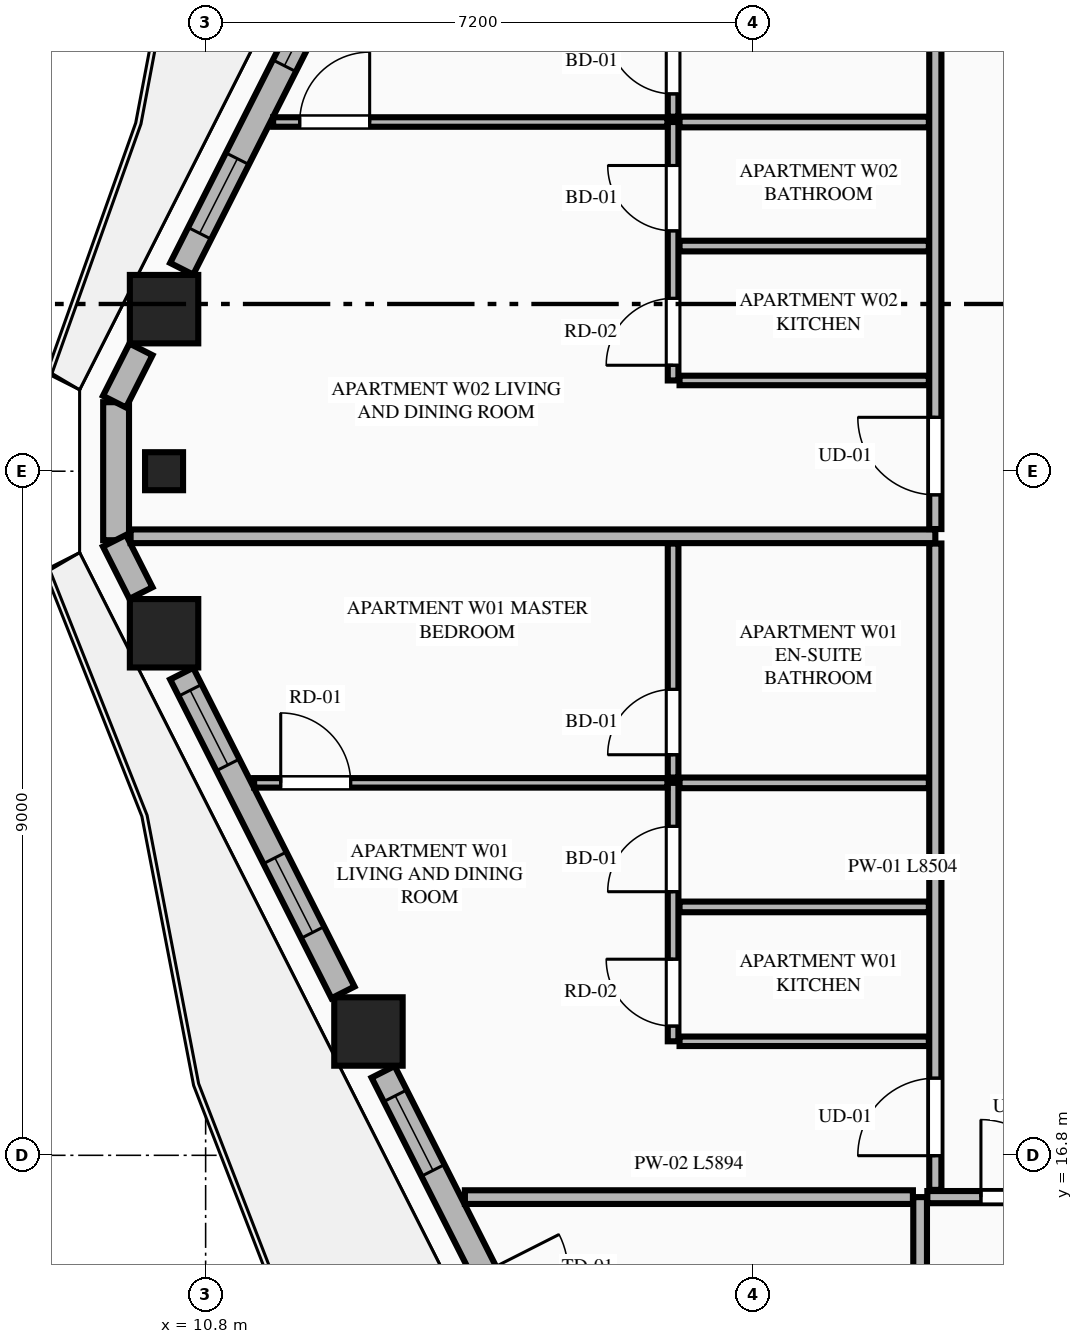
"""IFC4 building model, lengths in metres.
Left out: names, types, materials, properties, quantities, classifications, styles, units other than length and angle.
Written with IfcOpenShell. Run it as: python <this file> out.ifc"""

import sys

from ifc_helpers import new_model, si_unit, direction, frame, frame_2d, origin, origin_2d, place, context, subcontext, project, spatial, rectangle, extrude, element, fill, save


model = new_model("IFC4")
c1 = context("Model", 3, precision=1e-05, world=origin(), true_north=direction((0.0, 1.0)))
c2 = subcontext(c1, "Body", "Model", "MODEL_VIEW")
j1 = project(units=[si_unit("LENGTHUNIT", "METRE"), si_unit("PLANEANGLEUNIT", "RADIAN")], contexts=[c1])
p1 = place(None, origin())
s1 = spatial("IfcSite", under=j1, at=p1, CompositionType="ELEMENT")
p2 = place(p1, origin())
s2 = spatial("IfcBuilding", under=s1, at=p2, CompositionType="ELEMENT")
p3 = place(p2, frame((0.0, 0.0, 189.65)))
s3 = spatial("IfcBuildingStorey", under=s2, at=p3, CompositionType="ELEMENT", Elevation=189.65)
for number, where, z_axis, x_axis in (
    (1, (10.253, 27.932, 0.0), (0.0, 0.0, 1.0), (1.0, 0.0, 0.0)),
    (2, (10.253, 23.668, 0.0), (0.0, 0.0, 1.0), (1.0, 0.0, 0.0)),
    (3, (12.942, 18.429, 0.0), (0.0, 0.0, 1.0), (1.0, 0.0, 0.0)),
):
    element("IfcColumn", number, at=place(p3, frame(where, z_axis=z_axis, x_axis=x_axis)), inside=s3, PredefinedType="COLUMN", context=c2, shape_type="SweptSolid", body=[
        extrude(rectangle(XDim=0.9, YDim=0.9, at=origin_2d()), origin(), (0.0, 0.0, 1.0), 3.55),
    ])
p4 = place(p3, frame((10.253, 25.8, 0.0), z_axis=(0.0, 0.0, 1.0), x_axis=(0.0, -1.0, 0.0)))
e4 = element("IfcColumn", 4, at=p4, inside=s3, PredefinedType="PILASTER", context=c2, shape_type="SweptSolid", body=[
    extrude(rectangle(XDim=0.5, YDim=0.35, at=origin_2d()), origin(), (0.0, 0.0, 1.0), 3.55),
])
p5 = place(p3, frame((9.622, 26.708, 0.0), z_axis=(0.0, 0.0, 1.0), x_axis=(0.0, -1.0, 0.0)))
e5 = element("IfcWall", 5, at=p5, inside=s3, PredefinedType="STANDARD", context=c2, shape_type="SweptSolid", body=[
    extrude(rectangle(XDim=1.816, YDim=0.34, at=frame_2d((0.908, 0.0))), origin(), (0.0, 0.0, 1.0), 3.35),
])
p6 = place(p3, frame((12.607, 32.657, 0.0), z_axis=(0.0, 0.0, 1.0), x_axis=(-0.451426298588, -0.892308409096, 0.0)))
e6 = element("IfcWall", 6, at=p6, inside=s3, PredefinedType="STANDARD", context=c2, shape_type="SweptSolid", body=[
    extrude(rectangle(XDim=4.7, YDim=0.34, at=frame_2d((2.35, 0.0))), origin(), (0.0, 0.0, 1.0), 2.883),
])
p7 = place(p6, frame((0.607, 0.0, 0.75)))
e7 = element("IfcOpeningElement", 7, at=p7, cuts=e6, PredefinedType="OPENING", context=c2, shape_type="SweptSolid", body=[
    extrude(rectangle(XDim=1.1, YDim=1.983, at=frame_2d((0.55, 0.991))), frame((0.0, 0.18, 0.0), z_axis=(0.0, -1.0, 0.0), x_axis=(1.0, 0.0, 0.0)), (0.0, 0.0, 1.0), 0.36),
])
p8 = place(p6, frame((3.077, 0.0, 0.75)))
e8 = element("IfcOpeningElement", 8, at=p8, cuts=e6, PredefinedType="OPENING", context=c2, shape_type="SweptSolid", body=[
    extrude(rectangle(XDim=1.1, YDim=1.983, at=frame_2d((0.55, 0.991))), frame((0.0, 0.18, 0.0), z_axis=(0.0, -1.0, 0.0), x_axis=(1.0, 0.0, 0.0)), (0.0, 0.0, 1.0), 0.36),
])
for number, where, z_axis, x_axis in (
    (9, (9.949, 27.403, 0.0), (0.0, 0.0, 1.0), (-0.451, -0.892, 0.0)),
    (10, (9.601, 24.885, 0.0), (0.0, 0.0, 1.0), (0.451, -0.892, 0.0)),
):
    element("IfcWall", number, at=place(p3, frame(where, z_axis=z_axis, x_axis=x_axis)), inside=s3, PredefinedType="STANDARD", context=c2, shape_type="SweptSolid", body=[
        extrude(rectangle(XDim=0.771, YDim=0.34, at=frame_2d((0.385, 0.0))), origin(), (0.0, 0.0, 1.0), 3.35),
    ])
p9 = place(p3, frame((10.485, 23.137, 0.0), z_axis=(0.0, 0.0, 1.0), x_axis=(0.451447222193, -0.892297823361, 0.0)))
e11 = element("IfcWall", 11, at=p9, inside=s3, PredefinedType="STANDARD", context=c2, shape_type="SweptSolid", body=[
    extrude(rectangle(XDim=4.7, YDim=0.34, at=frame_2d((2.35, 0.0))), origin(), (0.0, 0.0, 1.0), 2.883),
])
p10 = place(p9, frame((0.246, 0.0, 0.75)))
e12 = element("IfcOpeningElement", 12, at=p10, cuts=e11, PredefinedType="OPENING", context=c2, shape_type="SweptSolid", body=[
    extrude(rectangle(XDim=1.1, YDim=1.983, at=frame_2d((0.55, 0.991))), frame((0.0, 0.18, 0.0), z_axis=(0.0, -1.0, 0.0), x_axis=(1.0, 0.0, 0.0)), (0.0, 0.0, 1.0), 0.36),
])
p11 = place(p9, frame((2.716, 0.0, 0.75)))
e13 = element("IfcOpeningElement", 13, at=p11, cuts=e11, PredefinedType="OPENING", context=c2, shape_type="SweptSolid", body=[
    extrude(rectangle(XDim=1.1, YDim=1.983, at=frame_2d((0.55, 0.991))), frame((0.0, 0.18, 0.0), z_axis=(0.0, -1.0, 0.0), x_axis=(1.0, 0.0, 0.0)), (0.0, 0.0, 1.0), 0.36),
])
p12 = place(p3, frame((13.135, 17.898, 0.0), z_axis=(0.0, 0.0, 1.0), x_axis=(0.451544279509, -0.892248711763, 0.0)))
e14 = element("IfcWall", 14, at=p12, inside=s3, PredefinedType="STANDARD", context=c2, shape_type="SweptSolid", body=[
    extrude(rectangle(XDim=4.91, YDim=0.34, at=frame_2d((2.455, 0.0))), origin(), (0.0, 0.0, 1.0), 2.883),
])
p13 = place(p12, frame((2.954, 0.0, 0.0)))
e15 = element("IfcOpeningElement", 15, at=p13, cuts=e14, PredefinedType="OPENING", context=c2, shape_type="SweptSolid", body=[
    extrude(rectangle(XDim=1.1, YDim=2.25, at=frame_2d((0.55, 1.125))), frame((0.0, 0.18, 0.0), z_axis=(0.0, -1.0, 0.0), x_axis=(1.0, 0.0, 0.0)), (0.0, 0.0, 1.0), 0.36),
])
p14 = place(p12, frame((0.353, 0.0, 0.75)))
e16 = element("IfcOpeningElement", 16, at=p14, cuts=e14, PredefinedType="OPENING", context=c2, shape_type="SweptSolid", body=[
    extrude(rectangle(XDim=1.1, YDim=1.983, at=frame_2d((0.55, 0.991))), frame((0.0, 0.18, 0.0), z_axis=(0.0, -1.0, 0.0), x_axis=(1.0, 0.0, 0.0)), (0.0, 0.0, 1.0), 0.36),
])
p15 = place(p3, frame((20.2, 5.968, 0.0), z_axis=(0.0, 0.0, 1.0), x_axis=(0.0, 1.0, 0.0)))
e17 = element("IfcWall", 17, at=p15, inside=s3, PredefinedType="PARTITIONING", context=c2, shape_type="SweptSolid", body=[
    extrude(rectangle(XDim=10.282, YDim=0.18, at=frame_2d((5.141, 0.0))), origin(), (0.0, 0.0, 1.0), 3.35),
])
p16 = place(p3, frame((20.295, 16.25, 0.0), z_axis=(0.0, 0.0, 1.0), x_axis=(1.0, 0.0, 0.0)))
e18 = element("IfcWall", 18, at=p16, inside=s3, PredefinedType="PARTITIONING", context=c2, shape_type="SweptSolid", body=[
    extrude(rectangle(XDim=8.467, YDim=0.16, at=frame_2d((4.233, 0.0))), origin(), (0.0, 0.0, 1.0), 3.35),
])
p17 = place(p16, frame((0.705, 0.0, 0.0)))
e19 = element("IfcOpeningElement", 19, at=p17, cuts=e18, PredefinedType="OPENING", context=c2, shape_type="SweptSolid", body=[
    extrude(rectangle(XDim=1.02, YDim=2.25, at=frame_2d((0.51, 1.125))), frame((0.0, 0.09, 0.0), z_axis=(0.0, -1.0, 0.0), x_axis=(1.0, 0.0, 0.0)), (0.0, 0.0, 1.0), 0.18),
])
p18 = place(p3, frame((14.211, 16.25, 0.0), z_axis=(0.0, 0.0, 1.0), x_axis=(1.0, 0.0, 0.0)))
e20 = element("IfcWall", 20, at=p18, inside=s3, PredefinedType="PARTITIONING", context=c2, shape_type="SweptSolid", body=[
    extrude(rectangle(XDim=5.894, YDim=0.18, at=frame_2d((2.947, 0.0))), origin(), (0.0, 0.0, 1.0), 3.35),
])
p19 = place(p3, frame((20.4, 16.345, 0.0), z_axis=(0.0, 0.0, 1.0), x_axis=(0.0, 1.0, 0.0)))
e21 = element("IfcWall", 21, at=p19, inside=s3, PredefinedType="PARTITIONING", context=c2, shape_type="SweptSolid", body=[
    extrude(rectangle(XDim=8.504, YDim=0.16, at=frame_2d((4.252, 0.0))), origin(), (0.0, 0.0, 1.0), 3.35),
])
p20 = place(p19, frame((0.45, 0.0, 0.0)))
e22 = element("IfcOpeningElement", 22, at=p20, cuts=e21, PredefinedType="OPENING", context=c2, shape_type="SweptSolid", body=[
    extrude(rectangle(XDim=1.02, YDim=2.25, at=frame_2d((0.51, 1.125))), frame((0.0, 0.09, 0.0), z_axis=(0.0, -1.0, 0.0), x_axis=(1.0, 0.0, 0.0)), (0.0, 0.0, 1.0), 0.18),
])
p21 = place(p3, frame((17.035, 18.3, 0.0), z_axis=(0.0, 0.0, 1.0), x_axis=(1.0, 0.0, 0.0)))
e23 = element("IfcWall", 23, at=p21, inside=s3, PredefinedType="PARTITIONING", context=c2, shape_type="SweptSolid", body=[
    extrude(rectangle(XDim=3.28, YDim=0.125, at=frame_2d((1.64, 0.0))), origin(), (0.0, 0.0, 1.0), 2.807),
])
p22 = place(p3, frame((16.95, 18.3, 0.0), z_axis=(0.0, 0.0, 1.0), x_axis=(0.0, 1.0, 0.0)))
e24 = element("IfcWall", 24, at=p22, inside=s3, PredefinedType="PLUMBINGWALL", context=c2, shape_type="SweptSolid", body=[
    extrude(rectangle(XDim=3.4, YDim=0.14, at=frame_2d((1.7, 0.0))), origin(), (0.0, 0.0, 1.0), 3.35),
])
p23 = place(p22, frame((0.2, 0.0, 0.0)))
e25 = element("IfcOpeningElement", 25, at=p23, cuts=e24, PredefinedType="OPENING", context=c2, shape_type="SweptSolid", body=[
    extrude(rectangle(XDim=0.88, YDim=2.15, at=frame_2d((0.44, 1.075))), frame((0.0, 0.08, 0.0), z_axis=(0.0, -1.0, 0.0), x_axis=(1.0, 0.0, 0.0)), (0.0, 0.0, 1.0), 0.16),
])
p24 = place(p22, frame((1.968, 0.0, 0.0)))
e26 = element("IfcOpeningElement", 26, at=p24, cuts=e24, PredefinedType="OPENING", context=c2, shape_type="SweptSolid", body=[
    extrude(rectangle(XDim=0.86, YDim=2.1, at=frame_2d((0.43, 1.05))), frame((0.0, 0.08, 0.0), z_axis=(0.0, -1.0, 0.0), x_axis=(1.0, 0.0, 0.0)), (0.0, 0.0, 1.0), 0.16),
])
p25 = place(p3, frame((16.95, 21.77, 0.0), z_axis=(0.0, 0.0, 1.0), x_axis=(0.0, 1.0, 0.0)))
e27 = element("IfcWall", 27, at=p25, inside=s3, PredefinedType="PLUMBINGWALL", context=c2, shape_type="SweptSolid", body=[
    extrude(rectangle(XDim=3.079, YDim=0.14, at=frame_2d((1.54, 0.0))), origin(), (0.0, 0.0, 1.0), 3.35),
])
p26 = place(p25, frame((0.3, 0.0, 0.0)))
e28 = element("IfcOpeningElement", 28, at=p26, cuts=e27, PredefinedType="OPENING", context=c2, shape_type="SweptSolid", body=[
    extrude(rectangle(XDim=0.86, YDim=2.1, at=frame_2d((0.43, 1.05))), frame((0.0, 0.08, 0.0), z_axis=(0.0, -1.0, 0.0), x_axis=(1.0, 0.0, 0.0)), (0.0, 0.0, 1.0), 0.16),
])
p27 = place(p3, frame((17.035, 21.7, 0.0), z_axis=(0.0, 0.0, 1.0), x_axis=(1.0, 0.0, 0.0)))
e29 = element("IfcWall", 29, at=p27, inside=s3, PredefinedType="PLUMBINGWALL", context=c2, shape_type="SweptSolid", body=[
    extrude(rectangle(XDim=3.28, YDim=0.14, at=frame_2d((1.64, 0.0))), origin(), (0.0, 0.0, 1.0), 3.35),
])
p28 = place(p3, frame((11.438, 21.7, 0.0), z_axis=(0.0, 0.0, 1.0), x_axis=(1.0, 0.0, 0.0)))
e30 = element("IfcWall", 30, at=p28, inside=s3, PredefinedType="PARTITIONING", context=c2, shape_type="SweptSolid", body=[
    extrude(rectangle(XDim=5.437, YDim=0.125, at=frame_2d((2.719, 0.0))), origin(), (0.0, 0.0, 1.0), 3.35),
])
p29 = place(p28, frame((0.35, 0.0, 0.0)))
e31 = element("IfcOpeningElement", 31, at=p29, cuts=e30, PredefinedType="OPENING", context=c2, shape_type="SweptSolid", body=[
    extrude(rectangle(XDim=0.92, YDim=2.15, at=frame_2d((0.46, 1.075))), frame((0.0, 0.073, 0.0), z_axis=(0.0, -1.0, 0.0), x_axis=(1.0, 0.0, 0.0)), (0.0, 0.0, 1.0), 0.145),
])
p30 = place(p3, frame((17.035, 20.068, 0.0), z_axis=(0.0, 0.0, 1.0), x_axis=(1.0, 0.0, 0.0)))
e32 = element("IfcWall", 32, at=p30, inside=s3, PredefinedType="PLUMBINGWALL", context=c2, shape_type="SweptSolid", body=[
    extrude(rectangle(XDim=3.28, YDim=0.14, at=frame_2d((1.64, 0.0))), origin(), (0.0, 0.0, 1.0), 3.35),
])
p31 = place(p3, frame((9.813, 24.944, 0.0), z_axis=(0.0, 0.0, 1.0), x_axis=(1.0, 0.0, 0.0)))
e33 = element("IfcWall", 33, at=p31, inside=s3, PredefinedType="PARTITIONING", context=c2, shape_type="SweptSolid", body=[
    extrude(rectangle(XDim=10.587, YDim=0.18, at=frame_2d((5.293, 0.0))), origin(), (0.0, 0.0, 1.0), 3.35),
])
p32 = place(p3, frame((20.4, 25.039, 0.0), z_axis=(0.0, 0.0, 1.0), x_axis=(0.0, 1.0, 0.0)))
e34 = element("IfcWall", 34, at=p32, inside=s3, PredefinedType="PARTITIONING", context=c2, shape_type="SweptSolid", body=[
    extrude(rectangle(XDim=10.016, YDim=0.16, at=frame_2d((5.008, 0.0))), origin(), (0.0, 0.0, 1.0), 3.35),
])
p33 = place(p32, frame((0.45, 0.0, 0.0)))
e35 = element("IfcOpeningElement", 35, at=p33, cuts=e34, PredefinedType="OPENING", context=c2, shape_type="SweptSolid", body=[
    extrude(rectangle(XDim=1.02, YDim=2.25, at=frame_2d((0.51, 1.125))), frame((0.0, 0.09, 0.0), z_axis=(0.0, -1.0, 0.0), x_axis=(1.0, 0.0, 0.0)), (0.0, 0.0, 1.0), 0.18),
])
p34 = place(p3, frame((17.035, 26.994, 0.0), z_axis=(0.0, 0.0, 1.0), x_axis=(1.0, 0.0, 0.0)))
e36 = element("IfcWall", 36, at=p34, inside=s3, PredefinedType="PARTITIONING", context=c2, shape_type="SweptSolid", body=[
    extrude(rectangle(XDim=3.28, YDim=0.125, at=frame_2d((1.64, 0.0))), origin(), (0.0, 0.0, 1.0), 3.35),
])
p35 = place(p3, frame((16.95, 26.994, 0.0), z_axis=(0.0, 0.0, 1.0), x_axis=(0.0, 1.0, 0.0)))
e37 = element("IfcWall", 37, at=p35, inside=s3, PredefinedType="PLUMBINGWALL", context=c2, shape_type="SweptSolid", body=[
    extrude(rectangle(XDim=3.4, YDim=0.14, at=frame_2d((1.7, 0.0))), origin(), (0.0, 0.0, 1.0), 3.35),
])
p36 = place(p35, frame((0.2, 0.0, 0.0)))
e38 = element("IfcOpeningElement", 38, at=p36, cuts=e37, PredefinedType="OPENING", context=c2, shape_type="SweptSolid", body=[
    extrude(rectangle(XDim=0.88, YDim=2.15, at=frame_2d((0.44, 1.075))), frame((0.0, 0.08, 0.0), z_axis=(0.0, -1.0, 0.0), x_axis=(1.0, 0.0, 0.0)), (0.0, 0.0, 1.0), 0.16),
])
p37 = place(p35, frame((1.968, 0.0, 0.0)))
e39 = element("IfcOpeningElement", 39, at=p37, cuts=e37, PredefinedType="OPENING", context=c2, shape_type="SweptSolid", body=[
    extrude(rectangle(XDim=0.86, YDim=2.1, at=frame_2d((0.43, 1.05))), frame((0.0, 0.08, 0.0), z_axis=(0.0, -1.0, 0.0), x_axis=(1.0, 0.0, 0.0)), (0.0, 0.0, 1.0), 0.16),
])
p38 = place(p3, frame((16.95, 30.464, 0.0), z_axis=(0.0, 0.0, 1.0), x_axis=(0.0, 1.0, 0.0)))
e40 = element("IfcWall", 40, at=p38, inside=s3, PredefinedType="PLUMBINGWALL", context=c2, shape_type="SweptSolid", body=[
    extrude(rectangle(XDim=4.591, YDim=0.14, at=frame_2d((2.295, 0.0))), origin(), (0.0, 0.0, 1.0), 3.35),
])
p39 = place(p38, frame((0.3, 0.0, 0.0)))
e41 = element("IfcOpeningElement", 41, at=p39, cuts=e40, PredefinedType="OPENING", context=c2, shape_type="SweptSolid", body=[
    extrude(rectangle(XDim=0.86, YDim=2.1, at=frame_2d((0.43, 1.05))), frame((0.0, 0.08, 0.0), z_axis=(0.0, -1.0, 0.0), x_axis=(1.0, 0.0, 0.0)), (0.0, 0.0, 1.0), 0.16),
])
p40 = place(p3, frame((17.035, 30.394, 0.0), z_axis=(0.0, 0.0, 1.0), x_axis=(1.0, 0.0, 0.0)))
e42 = element("IfcWall", 42, at=p40, inside=s3, PredefinedType="PLUMBINGWALL", context=c2, shape_type="SweptSolid", body=[
    extrude(rectangle(XDim=3.28, YDim=0.14, at=frame_2d((1.64, 0.0))), origin(), (0.0, 0.0, 1.0), 3.35),
])
p41 = place(p3, frame((11.688, 30.394, 0.0), z_axis=(0.0, 0.0, 1.0), x_axis=(1.0, 0.0, 0.0)))
e43 = element("IfcWall", 43, at=p41, inside=s3, PredefinedType="PARTITIONING", context=c2, shape_type="SweptSolid", body=[
    extrude(rectangle(XDim=5.187, YDim=0.125, at=frame_2d((2.594, 0.0))), origin(), (0.0, 0.0, 1.0), 3.35),
])
p42 = place(p41, frame((0.35, 0.0, 0.0)))
e44 = element("IfcOpeningElement", 44, at=p42, cuts=e43, PredefinedType="OPENING", context=c2, shape_type="SweptSolid", body=[
    extrude(rectangle(XDim=0.92, YDim=2.15, at=frame_2d((0.46, 1.075))), frame((0.0, 0.073, 0.0), z_axis=(0.0, -1.0, 0.0), x_axis=(1.0, 0.0, 0.0)), (0.0, 0.0, 1.0), 0.145),
])
p43 = place(p3, frame((17.035, 28.762, 0.0), z_axis=(0.0, 0.0, 1.0), x_axis=(1.0, 0.0, 0.0)))
e45 = element("IfcWall", 45, at=p43, inside=s3, PredefinedType="PLUMBINGWALL", context=c2, shape_type="SweptSolid", body=[
    extrude(rectangle(XDim=3.28, YDim=0.14, at=frame_2d((1.64, 0.0))), origin(), (0.0, 0.0, 1.0), 3.35),
])
p44 = place(p7, origin())
e46 = element("IfcWindow", 46, at=p44, inside=s3, PartitioningType="SINGLE_PANEL", PredefinedType="WINDOW", context=c2, shape_type="SweptSolid", body=[
    extrude(rectangle(XDim=1.1, YDim=1.983, at=frame_2d((0.55, 0.991))), frame((0.0, 0.03, 0.0), z_axis=(0.0, -1.0, 0.0), x_axis=(1.0, 0.0, 0.0)), (0.0, 0.0, 1.0), 0.06),
])
fill(e7, e46)
p45 = place(p10, origin())
e47 = element("IfcWindow", 47, at=p45, inside=s3, PartitioningType="SINGLE_PANEL", PredefinedType="WINDOW", context=c2, shape_type="SweptSolid", body=[
    extrude(rectangle(XDim=1.1, YDim=1.983, at=frame_2d((0.55, 0.991))), frame((0.0, 0.03, 0.0), z_axis=(0.0, -1.0, 0.0), x_axis=(1.0, 0.0, 0.0)), (0.0, 0.0, 1.0), 0.06),
])
fill(e12, e47)
p46 = place(p17, origin())
e48 = element("IfcDoor", 48, at=p46, inside=s3, OperationType="SINGLE_SWING_LEFT", PredefinedType="DOOR", context=c2, shape_type="SweptSolid", body=[
    extrude(rectangle(XDim=1.02, YDim=2.25, at=frame_2d((0.51, 1.125))), frame((0.0, 0.025, 0.0), z_axis=(0.0, -1.0, 0.0), x_axis=(1.0, 0.0, 0.0)), (0.0, 0.0, 1.0), 0.05),
])
fill(e19, e48)
p47 = place(p23, origin())
e49 = element("IfcDoor", 49, at=p47, inside=s3, OperationType="SINGLE_SWING_RIGHT", PredefinedType="DOOR", context=c2, shape_type="SweptSolid", body=[
    extrude(rectangle(XDim=0.88, YDim=2.15, at=frame_2d((0.44, 1.075))), frame((0.0, 0.025, 0.0), z_axis=(0.0, -1.0, 0.0), x_axis=(1.0, 0.0, 0.0)), (0.0, 0.0, 1.0), 0.05),
])
fill(e25, e49)
p48 = place(p24, origin())
e50 = element("IfcDoor", 50, at=p48, inside=s3, OperationType="SINGLE_SWING_LEFT", PredefinedType="DOOR", context=c2, shape_type="SweptSolid", body=[
    extrude(rectangle(XDim=0.86, YDim=2.1, at=frame_2d((0.43, 1.05))), frame((0.0, 0.025, 0.0), z_axis=(0.0, -1.0, 0.0), x_axis=(1.0, 0.0, 0.0)), (0.0, 0.0, 1.0), 0.05),
])
fill(e26, e50)
p49 = place(p26, origin())
e51 = element("IfcDoor", 51, at=p49, inside=s3, OperationType="SINGLE_SWING_LEFT", PredefinedType="DOOR", context=c2, shape_type="SweptSolid", body=[
    extrude(rectangle(XDim=0.86, YDim=2.1, at=frame_2d((0.43, 1.05))), frame((0.0, 0.025, 0.0), z_axis=(0.0, -1.0, 0.0), x_axis=(1.0, 0.0, 0.0)), (0.0, 0.0, 1.0), 0.05),
])
fill(e28, e51)
p50 = place(p20, origin())
e52 = element("IfcDoor", 52, at=p50, inside=s3, OperationType="SINGLE_SWING_LEFT", PredefinedType="DOOR", context=c2, shape_type="SweptSolid", body=[
    extrude(rectangle(XDim=1.02, YDim=2.25, at=frame_2d((0.51, 1.125))), frame((0.0, 0.025, 0.0), z_axis=(0.0, -1.0, 0.0), x_axis=(1.0, 0.0, 0.0)), (0.0, 0.0, 1.0), 0.05),
])
fill(e22, e52)
p51 = place(p29, origin())
e53 = element("IfcDoor", 53, at=p51, inside=s3, OperationType="SINGLE_SWING_LEFT", PredefinedType="DOOR", context=c2, shape_type="SweptSolid", body=[
    extrude(rectangle(XDim=0.92, YDim=2.15, at=frame_2d((0.46, 1.075))), frame((0.0, 0.025, 0.0), z_axis=(0.0, -1.0, 0.0), x_axis=(1.0, 0.0, 0.0)), (0.0, 0.0, 1.0), 0.05),
])
fill(e31, e53)
p52 = place(p36, origin())
e54 = element("IfcDoor", 54, at=p52, inside=s3, OperationType="SINGLE_SWING_LEFT", PredefinedType="DOOR", context=c2, shape_type="SweptSolid", body=[
    extrude(rectangle(XDim=0.88, YDim=2.15, at=frame_2d((0.44, 1.075))), frame((0.0, 0.025, 0.0), z_axis=(0.0, -1.0, 0.0), x_axis=(1.0, 0.0, 0.0)), (0.0, 0.0, 1.0), 0.05),
])
fill(e38, e54)
p53 = place(p37, origin())
e55 = element("IfcDoor", 55, at=p53, inside=s3, OperationType="SINGLE_SWING_RIGHT", PredefinedType="DOOR", context=c2, shape_type="SweptSolid", body=[
    extrude(rectangle(XDim=0.86, YDim=2.1, at=frame_2d((0.43, 1.05))), frame((0.0, 0.025, 0.0), z_axis=(0.0, -1.0, 0.0), x_axis=(1.0, 0.0, 0.0)), (0.0, 0.0, 1.0), 0.05),
])
fill(e39, e55)
p54 = place(p39, origin())
e56 = element("IfcDoor", 56, at=p54, inside=s3, OperationType="SINGLE_SWING_RIGHT", PredefinedType="DOOR", context=c2, shape_type="SweptSolid", body=[
    extrude(rectangle(XDim=0.86, YDim=2.1, at=frame_2d((0.43, 1.05))), frame((0.0, 0.025, 0.0), z_axis=(0.0, -1.0, 0.0), x_axis=(1.0, 0.0, 0.0)), (0.0, 0.0, 1.0), 0.05),
])
fill(e41, e56)
p55 = place(p33, origin())
e57 = element("IfcDoor", 57, at=p55, inside=s3, OperationType="SINGLE_SWING_RIGHT", PredefinedType="DOOR", context=c2, shape_type="SweptSolid", body=[
    extrude(rectangle(XDim=1.02, YDim=2.25, at=frame_2d((0.51, 1.125))), frame((0.0, 0.025, 0.0), z_axis=(0.0, -1.0, 0.0), x_axis=(1.0, 0.0, 0.0)), (0.0, 0.0, 1.0), 0.05),
])
fill(e35, e57)
p56 = place(p42, origin())
e58 = element("IfcDoor", 58, at=p56, inside=s3, OperationType="SINGLE_SWING_RIGHT", PredefinedType="DOOR", context=c2, shape_type="SweptSolid", body=[
    extrude(rectangle(XDim=0.92, YDim=2.15, at=frame_2d((0.46, 1.075))), frame((0.0, 0.025, 0.0), z_axis=(0.0, -1.0, 0.0), x_axis=(1.0, 0.0, 0.0)), (0.0, 0.0, 1.0), 0.05),
])
fill(e44, e58)
p57 = place(p8, origin())
e59 = element("IfcWindow", 59, at=p57, inside=s3, PartitioningType="SINGLE_PANEL", PredefinedType="WINDOW", context=c2, shape_type="SweptSolid", body=[
    extrude(rectangle(XDim=1.1, YDim=1.983, at=frame_2d((0.55, 0.991))), frame((0.0, 0.03, 0.0), z_axis=(0.0, -1.0, 0.0), x_axis=(1.0, 0.0, 0.0)), (0.0, 0.0, 1.0), 0.06),
])
fill(e8, e59)
p58 = place(p11, origin())
e60 = element("IfcWindow", 60, at=p58, inside=s3, PartitioningType="SINGLE_PANEL", PredefinedType="WINDOW", context=c2, shape_type="SweptSolid", body=[
    extrude(rectangle(XDim=1.1, YDim=1.983, at=frame_2d((0.55, 0.991))), frame((0.0, 0.03, 0.0), z_axis=(0.0, -1.0, 0.0), x_axis=(1.0, 0.0, 0.0)), (0.0, 0.0, 1.0), 0.06),
])
fill(e13, e60)
p59 = place(p14, origin())
e61 = element("IfcWindow", 61, at=p59, inside=s3, PartitioningType="SINGLE_PANEL", PredefinedType="WINDOW", context=c2, shape_type="SweptSolid", body=[
    extrude(rectangle(XDim=1.1, YDim=1.983, at=frame_2d((0.55, 0.991))), frame((0.0, 0.03, 0.0), z_axis=(0.0, -1.0, 0.0), x_axis=(1.0, 0.0, 0.0)), (0.0, 0.0, 1.0), 0.06),
])
fill(e16, e61)
save(model, sys.argv[1])
